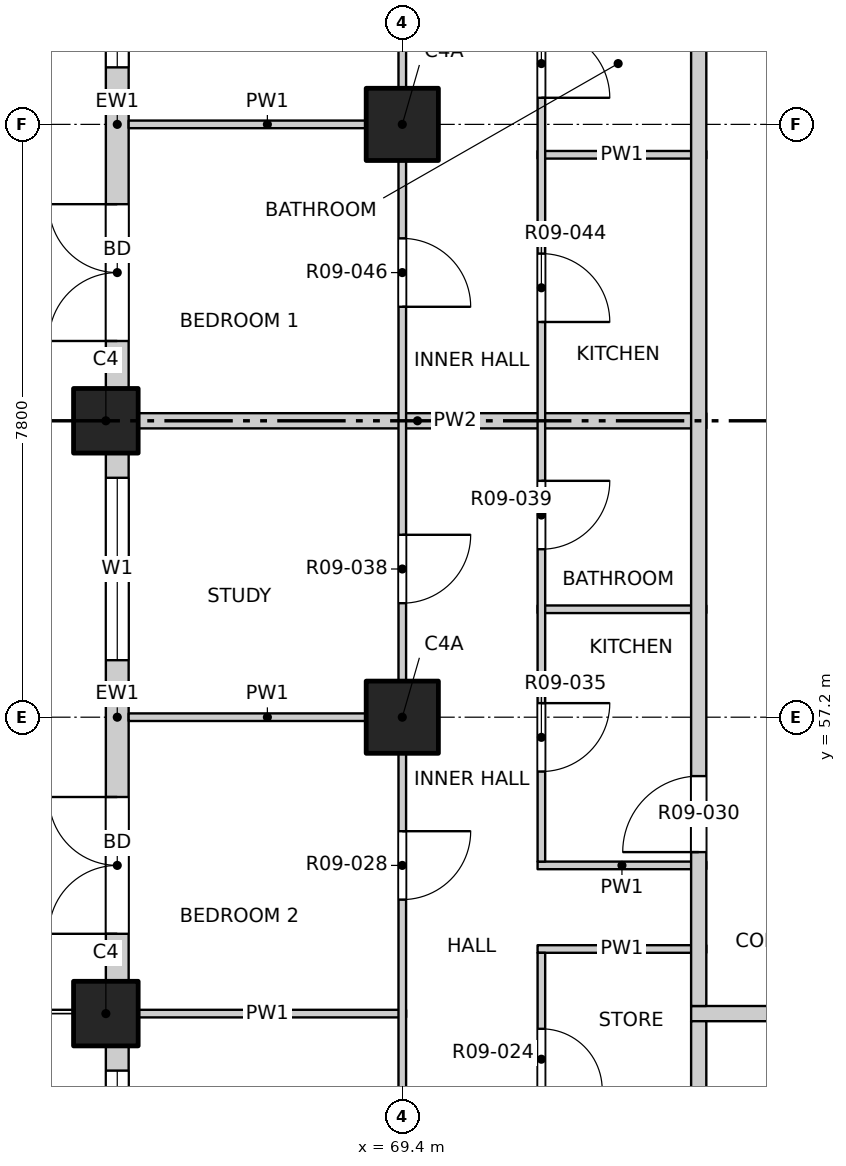
"""IFC4 building model, lengths in metres.
Left out: names, types, materials, properties, quantities, classifications, styles, units other than length and angle.
Written with IfcOpenShell. Run it as: python <this file> out.ifc"""

import sys

from ifc_helpers import new_model, si_unit, direction, frame, frame_2d, origin, origin_2d, place, context, subcontext, project, spatial, rectangle, extrude, element, fill, save


model = new_model("IFC4")
c1 = context("Model", 3, precision=1e-05, world=origin(), true_north=direction((0.0, 1.0)))
c2 = subcontext(c1, "Body", "Model", "MODEL_VIEW")
j1 = project(units=[si_unit("LENGTHUNIT", "METRE"), si_unit("PLANEANGLEUNIT", "RADIAN")], contexts=[c1])
p1 = place(None, origin())
s1 = spatial("IfcSite", under=j1, at=p1, CompositionType="ELEMENT")
p2 = place(p1, origin())
s2 = spatial("IfcBuilding", under=s1, at=p2, CompositionType="ELEMENT")
p3 = place(p2, frame((0.0, 0.0, 113.5)))
s3 = spatial("IfcBuildingStorey", under=s2, at=p3, CompositionType="ELEMENT", Elevation=113.5)
for number, where, z_axis, x_axis in (
    (1, (65.5, 53.3, -0.25), (0.0, 0.0, 1.0), (1.0, 0.0, 0.0)),
    (2, (65.5, 61.1, -0.25), (0.0, 0.0, 1.0), (1.0, 0.0, 0.0)),
):
    element("IfcColumn", number, at=place(p3, frame(where, z_axis=z_axis, x_axis=x_axis)), inside=s3, PredefinedType="COLUMN", context=c2, shape_type="SweptSolid", body=[
        extrude(rectangle(XDim=0.85, YDim=0.85, at=origin_2d()), origin(), (0.0, 0.0, 1.0), 3.35),
    ])
for number, where, z_axis, x_axis in (
    (3, (69.4, 57.2, -0.25), (0.0, 0.0, 1.0), (1.0, 0.0, 0.0)),
    (4, (69.4, 65.0, -0.25), (0.0, 0.0, 1.0), (1.0, 0.0, 0.0)),
):
    element("IfcColumn", number, at=place(p3, frame(where, z_axis=z_axis, x_axis=x_axis)), inside=s3, PredefinedType="COLUMN", context=c2, shape_type="SweptSolid", body=[
        extrude(rectangle(XDim=0.95, YDim=0.95, at=origin_2d()), origin(), (0.0, 0.0, 1.0), 3.35),
    ])
p4 = place(p3, frame((65.65, 49.4, 0.0), z_axis=(0.0, 0.0, 1.0), x_axis=(0.0, 1.0, 0.0)))
e5 = element("IfcWall", 5, at=p4, inside=s3, PredefinedType="SOLIDWALL", context=c2, shape_type="SweptSolid", body=[
    extrude(rectangle(XDim=3.475, YDim=0.3, at=frame_2d((1.738, 0.0))), origin(), (0.0, 0.0, 1.0), 3.1),
])
p5 = place(p4, frame((0.75, 0.0, 0.9)))
e6 = element("IfcOpeningElement", 6, at=p5, cuts=e5, PredefinedType="OPENING", context=c2, shape_type="SweptSolid", body=[
    extrude(rectangle(XDim=2.4, YDim=1.8, at=frame_2d((1.2, 0.9))), frame((0.0, 0.16, 0.0), z_axis=(0.0, -1.0, 0.0), x_axis=(1.0, 0.0, 0.0)), (0.0, 0.0, 1.0), 0.32),
])
p6 = place(p3, frame((65.65, 53.725, 0.0), z_axis=(0.0, 0.0, 1.0), x_axis=(0.0, 1.0, 0.0)))
e7 = element("IfcWall", 7, at=p6, inside=s3, PredefinedType="SOLIDWALL", context=c2, shape_type="SweptSolid", body=[
    extrude(rectangle(XDim=6.95, YDim=0.3, at=frame_2d((3.475, 0.0))), origin(), (0.0, 0.0, 1.0), 3.1),
])
p7 = place(p6, frame((0.625, 0.0, 0.0)))
e8 = element("IfcOpeningElement", 8, at=p7, cuts=e7, PredefinedType="OPENING", context=c2, shape_type="SweptSolid", body=[
    extrude(rectangle(XDim=1.8, YDim=2.4, at=frame_2d((0.9, 1.2))), frame((0.0, 0.16, 0.0), z_axis=(0.0, -1.0, 0.0), x_axis=(1.0, 0.0, 0.0)), (0.0, 0.0, 1.0), 0.32),
])
p8 = place(p6, frame((4.225, 0.0, 0.9)))
e9 = element("IfcOpeningElement", 9, at=p8, cuts=e7, PredefinedType="OPENING", context=c2, shape_type="SweptSolid", body=[
    extrude(rectangle(XDim=2.4, YDim=1.8, at=frame_2d((1.2, 0.9))), frame((0.0, 0.16, 0.0), z_axis=(0.0, -1.0, 0.0), x_axis=(1.0, 0.0, 0.0)), (0.0, 0.0, 1.0), 0.32),
])
p9 = place(p3, frame((65.65, 61.525, 0.0), z_axis=(0.0, 0.0, 1.0), x_axis=(0.0, 1.0, 0.0)))
e10 = element("IfcWall", 10, at=p9, inside=s3, PredefinedType="SOLIDWALL", context=c2, shape_type="SweptSolid", body=[
    extrude(rectangle(XDim=6.95, YDim=0.3, at=frame_2d((3.475, 0.0))), origin(), (0.0, 0.0, 1.0), 3.1),
])
p10 = place(p9, frame((0.625, 0.0, 0.0)))
e11 = element("IfcOpeningElement", 11, at=p10, cuts=e10, PredefinedType="OPENING", context=c2, shape_type="SweptSolid", body=[
    extrude(rectangle(XDim=1.8, YDim=2.4, at=frame_2d((0.9, 1.2))), frame((0.0, 0.16, 0.0), z_axis=(0.0, -1.0, 0.0), x_axis=(1.0, 0.0, 0.0)), (0.0, 0.0, 1.0), 0.32),
])
p11 = place(p9, frame((4.225, 0.0, 0.9)))
e12 = element("IfcOpeningElement", 12, at=p11, cuts=e10, PredefinedType="OPENING", context=c2, shape_type="SweptSolid", body=[
    extrude(rectangle(XDim=2.4, YDim=1.8, at=frame_2d((1.2, 0.9))), frame((0.0, 0.16, 0.0), z_axis=(0.0, -1.0, 0.0), x_axis=(1.0, 0.0, 0.0)), (0.0, 0.0, 1.0), 0.32),
])
p12 = place(p3, frame((65.8, 53.3, 0.0), z_axis=(0.0, 0.0, 1.0), x_axis=(1.0, 0.0, 0.0)))
e13 = element("IfcWall", 13, at=p12, inside=s3, PredefinedType="PARTITIONING", context=c2, shape_type="SweptSolid", body=[
    extrude(rectangle(XDim=3.65, YDim=0.1, at=frame_2d((1.825, 0.0))), origin(), (0.0, 0.0, 1.0), 3.1),
])
p13 = place(p3, frame((73.2, 53.3, 0.0), z_axis=(0.0, 0.0, 1.0), x_axis=(1.0, 0.0, 0.0)))
e14 = element("IfcWall", 14, at=p13, inside=s3, PredefinedType="PARTITIONING", context=c2, shape_type="SweptSolid", body=[
    extrude(rectangle(XDim=23.6, YDim=0.2, at=frame_2d((11.8, 0.0))), origin(), (0.0, 0.0, 1.0), 3.1),
])
p14 = place(p13, frame((10.375, 0.0, 0.0)))
e15 = element("IfcOpeningElement", 15, at=p14, cuts=e14, PredefinedType="OPENING", context=c2, shape_type="SweptSolid", body=[
    extrude(rectangle(XDim=1.0, YDim=2.1, at=frame_2d((0.5, 1.05))), frame((0.0, 0.11, 0.0), z_axis=(0.0, -1.0, 0.0), x_axis=(1.0, 0.0, 0.0)), (0.0, 0.0, 1.0), 0.22),
])
p15 = place(p13, frame((22.075, 0.0, 0.0)))
e16 = element("IfcOpeningElement", 16, at=p15, cuts=e14, PredefinedType="OPENING", context=c2, shape_type="SweptSolid", body=[
    extrude(rectangle(XDim=1.0, YDim=2.1, at=frame_2d((0.5, 1.05))), frame((0.0, 0.11, 0.0), z_axis=(0.0, -1.0, 0.0), x_axis=(1.0, 0.0, 0.0)), (0.0, 0.0, 1.0), 0.22),
])
for number, where, z_axis, x_axis in (
    (17, (71.18, 54.15, 0.0), (0.0, 0.0, 1.0), (1.0, 0.0, 0.0)),
    (18, (71.18, 55.25, 0.0), (0.0, 0.0, 1.0), (1.0, 0.0, 0.0)),
):
    element("IfcWall", number, at=place(p3, frame(where, z_axis=z_axis, x_axis=x_axis)), inside=s3, PredefinedType="PARTITIONING", context=c2, shape_type="SweptSolid", body=[
        extrude(rectangle(XDim=2.22, YDim=0.1, at=frame_2d((1.11, 0.0))), origin(), (0.0, 0.0, 1.0), 3.1),
    ])
p16 = place(p3, frame((65.8, 57.2, 0.0), z_axis=(0.0, 0.0, 1.0), x_axis=(1.0, 0.0, 0.0)))
e19 = element("IfcWall", 19, at=p16, inside=s3, PredefinedType="PARTITIONING", context=c2, shape_type="SweptSolid", body=[
    extrude(rectangle(XDim=3.65, YDim=0.1, at=frame_2d((1.825, 0.0))), origin(), (0.0, 0.0, 1.0), 3.1),
])
p17 = place(p3, frame((71.18, 58.62, 0.0), z_axis=(0.0, 0.0, 1.0), x_axis=(1.0, 0.0, 0.0)))
e20 = element("IfcWall", 20, at=p17, inside=s3, PredefinedType="PARTITIONING", context=c2, shape_type="SweptSolid", body=[
    extrude(rectangle(XDim=2.22, YDim=0.1, at=frame_2d((1.11, 0.0))), origin(), (0.0, 0.0, 1.0), 3.1),
])
p18 = place(p3, frame((65.8, 61.1, 0.0), z_axis=(0.0, 0.0, 1.0), x_axis=(1.0, 0.0, 0.0)))
e21 = element("IfcWall", 21, at=p18, inside=s3, PredefinedType="PARTITIONING", context=c2, shape_type="SweptSolid", body=[
    extrude(rectangle(XDim=7.6, YDim=0.2, at=frame_2d((3.8, 0.0))), origin(), (0.0, 0.0, 1.0), 3.1),
])
p19 = place(p3, frame((71.18, 64.6, 0.0), z_axis=(0.0, 0.0, 1.0), x_axis=(1.0, 0.0, 0.0)))
e22 = element("IfcWall", 22, at=p19, inside=s3, PredefinedType="PARTITIONING", context=c2, shape_type="SweptSolid", body=[
    extrude(rectangle(XDim=2.22, YDim=0.1, at=frame_2d((1.11, 0.0))), origin(), (0.0, 0.0, 1.0), 3.1),
])
p20 = place(p3, frame((65.8, 65.0, 0.0), z_axis=(0.0, 0.0, 1.0), x_axis=(1.0, 0.0, 0.0)))
e23 = element("IfcWall", 23, at=p20, inside=s3, PredefinedType="PARTITIONING", context=c2, shape_type="SweptSolid", body=[
    extrude(rectangle(XDim=3.65, YDim=0.1, at=frame_2d((1.825, 0.0))), origin(), (0.0, 0.0, 1.0), 3.1),
])
p21 = place(p3, frame((69.4, 45.8, 0.0), z_axis=(0.0, 0.0, 1.0), x_axis=(0.0, 1.0, 0.0)))
e24 = element("IfcWall", 24, at=p21, inside=s3, PredefinedType="PARTITIONING", context=c2, shape_type="SweptSolid", body=[
    extrude(rectangle(XDim=38.4, YDim=0.1, at=frame_2d((19.2, 0.0))), origin(), (0.0, 0.0, 1.0), 3.1),
])
p22 = place(p21, frame((1.05, 0.0, 0.0)))
e25 = element("IfcOpeningElement", 25, at=p22, cuts=e24, PredefinedType="OPENING", context=c2, shape_type="SweptSolid", body=[
    extrude(rectangle(XDim=1.2, YDim=2.1, at=frame_2d((0.6, 1.05))), frame((0.0, 0.06, 0.0), z_axis=(0.0, -1.0, 0.0), x_axis=(1.0, 0.0, 0.0)), (0.0, 0.0, 1.0), 0.12),
])
p23 = place(p21, frame((5.1, 0.0, 0.0)))
e26 = element("IfcOpeningElement", 26, at=p23, cuts=e24, PredefinedType="OPENING", context=c2, shape_type="SweptSolid", body=[
    extrude(rectangle(XDim=0.9, YDim=2.1, at=frame_2d((0.45, 1.05))), frame((0.0, 0.06, 0.0), z_axis=(0.0, -1.0, 0.0), x_axis=(1.0, 0.0, 0.0)), (0.0, 0.0, 1.0), 0.12),
])
p24 = place(p21, frame((9.0, 0.0, 0.0)))
e27 = element("IfcOpeningElement", 27, at=p24, cuts=e24, PredefinedType="OPENING", context=c2, shape_type="SweptSolid", body=[
    extrude(rectangle(XDim=0.9, YDim=2.1, at=frame_2d((0.45, 1.05))), frame((0.0, 0.06, 0.0), z_axis=(0.0, -1.0, 0.0), x_axis=(1.0, 0.0, 0.0)), (0.0, 0.0, 1.0), 0.12),
])
p25 = place(p21, frame((12.9, 0.0, 0.0)))
e28 = element("IfcOpeningElement", 28, at=p25, cuts=e24, PredefinedType="OPENING", context=c2, shape_type="SweptSolid", body=[
    extrude(rectangle(XDim=0.9, YDim=2.1, at=frame_2d((0.45, 1.05))), frame((0.0, 0.06, 0.0), z_axis=(0.0, -1.0, 0.0), x_axis=(1.0, 0.0, 0.0)), (0.0, 0.0, 1.0), 0.12),
])
p26 = place(p21, frame((16.8, 0.0, 0.0)))
e29 = element("IfcOpeningElement", 29, at=p26, cuts=e24, PredefinedType="OPENING", context=c2, shape_type="SweptSolid", body=[
    extrude(rectangle(XDim=0.9, YDim=2.1, at=frame_2d((0.45, 1.05))), frame((0.0, 0.06, 0.0), z_axis=(0.0, -1.0, 0.0), x_axis=(1.0, 0.0, 0.0)), (0.0, 0.0, 1.0), 0.12),
])
p27 = place(p21, frame((20.7, 0.0, 0.0)))
e30 = element("IfcOpeningElement", 30, at=p27, cuts=e24, PredefinedType="OPENING", context=c2, shape_type="SweptSolid", body=[
    extrude(rectangle(XDim=0.9, YDim=2.1, at=frame_2d((0.45, 1.05))), frame((0.0, 0.06, 0.0), z_axis=(0.0, -1.0, 0.0), x_axis=(1.0, 0.0, 0.0)), (0.0, 0.0, 1.0), 0.12),
])
p28 = place(p21, frame((24.6, 0.0, 0.0)))
e31 = element("IfcOpeningElement", 31, at=p28, cuts=e24, PredefinedType="OPENING", context=c2, shape_type="SweptSolid", body=[
    extrude(rectangle(XDim=0.9, YDim=2.1, at=frame_2d((0.45, 1.05))), frame((0.0, 0.06, 0.0), z_axis=(0.0, -1.0, 0.0), x_axis=(1.0, 0.0, 0.0)), (0.0, 0.0, 1.0), 0.12),
])
p29 = place(p21, frame((28.5, 0.0, 0.0)))
e32 = element("IfcOpeningElement", 32, at=p29, cuts=e24, PredefinedType="OPENING", context=c2, shape_type="SweptSolid", body=[
    extrude(rectangle(XDim=0.9, YDim=2.1, at=frame_2d((0.45, 1.05))), frame((0.0, 0.06, 0.0), z_axis=(0.0, -1.0, 0.0), x_axis=(1.0, 0.0, 0.0)), (0.0, 0.0, 1.0), 0.12),
])
p30 = place(p21, frame((32.4, 0.0, 0.0)))
e33 = element("IfcOpeningElement", 33, at=p30, cuts=e24, PredefinedType="OPENING", context=c2, shape_type="SweptSolid", body=[
    extrude(rectangle(XDim=0.9, YDim=2.1, at=frame_2d((0.45, 1.05))), frame((0.0, 0.06, 0.0), z_axis=(0.0, -1.0, 0.0), x_axis=(1.0, 0.0, 0.0)), (0.0, 0.0, 1.0), 0.12),
])
p31 = place(p21, frame((36.15, 0.0, 0.0)))
e34 = element("IfcOpeningElement", 34, at=p31, cuts=e24, PredefinedType="OPENING", context=c2, shape_type="SweptSolid", body=[
    extrude(rectangle(XDim=1.2, YDim=2.1, at=frame_2d((0.6, 1.05))), frame((0.0, 0.06, 0.0), z_axis=(0.0, -1.0, 0.0), x_axis=(1.0, 0.0, 0.0)), (0.0, 0.0, 1.0), 0.12),
])
p32 = place(p3, frame((71.23, 49.45, 0.0), z_axis=(0.0, 0.0, 1.0), x_axis=(0.0, 1.0, 0.0)))
e35 = element("IfcWall", 35, at=p32, inside=s3, PredefinedType="PARTITIONING", context=c2, shape_type="SweptSolid", body=[
    extrude(rectangle(XDim=4.65, YDim=0.1, at=frame_2d((2.325, 0.0))), origin(), (0.0, 0.0, 1.0), 3.1),
])
p33 = place(p32, frame((0.425, 0.0, 0.0)))
e36 = element("IfcOpeningElement", 36, at=p33, cuts=e35, PredefinedType="OPENING", context=c2, shape_type="SweptSolid", body=[
    extrude(rectangle(XDim=0.9, YDim=2.1, at=frame_2d((0.45, 1.05))), frame((0.0, 0.06, 0.0), z_axis=(0.0, -1.0, 0.0), x_axis=(1.0, 0.0, 0.0)), (0.0, 0.0, 1.0), 0.12),
])
p34 = place(p32, frame((2.85, 0.0, 0.0)))
e37 = element("IfcOpeningElement", 37, at=p34, cuts=e35, PredefinedType="OPENING", context=c2, shape_type="SweptSolid", body=[
    extrude(rectangle(XDim=0.8, YDim=2.1, at=frame_2d((0.4, 1.05))), frame((0.0, 0.06, 0.0), z_axis=(0.0, -1.0, 0.0), x_axis=(1.0, 0.0, 0.0)), (0.0, 0.0, 1.0), 0.12),
])
p35 = place(p3, frame((71.23, 55.3, 0.0), z_axis=(0.0, 0.0, 1.0), x_axis=(0.0, 1.0, 0.0)))
e38 = element("IfcWall", 38, at=p35, inside=s3, PredefinedType="PARTITIONING", context=c2, shape_type="SweptSolid", body=[
    extrude(rectangle(XDim=11.65, YDim=0.1, at=frame_2d((5.825, 0.0))), origin(), (0.0, 0.0, 1.0), 3.1),
])
p36 = place(p35, frame((1.185, 0.0, 0.0)))
e39 = element("IfcOpeningElement", 39, at=p36, cuts=e38, PredefinedType="OPENING", context=c2, shape_type="SweptSolid", body=[
    extrude(rectangle(XDim=0.9, YDim=2.1, at=frame_2d((0.45, 1.05))), frame((0.0, 0.06, 0.0), z_axis=(0.0, -1.0, 0.0), x_axis=(1.0, 0.0, 0.0)), (0.0, 0.0, 1.0), 0.12),
])
p37 = place(p35, frame((4.11, 0.0, 0.0)))
e40 = element("IfcOpeningElement", 40, at=p37, cuts=e38, PredefinedType="OPENING", context=c2, shape_type="SweptSolid", body=[
    extrude(rectangle(XDim=0.9, YDim=2.1, at=frame_2d((0.45, 1.05))), frame((0.0, 0.06, 0.0), z_axis=(0.0, -1.0, 0.0), x_axis=(1.0, 0.0, 0.0)), (0.0, 0.0, 1.0), 0.12),
])
p38 = place(p35, frame((7.1, 0.0, 0.0)))
e41 = element("IfcOpeningElement", 41, at=p38, cuts=e38, PredefinedType="OPENING", context=c2, shape_type="SweptSolid", body=[
    extrude(rectangle(XDim=0.9, YDim=2.1, at=frame_2d((0.45, 1.05))), frame((0.0, 0.06, 0.0), z_axis=(0.0, -1.0, 0.0), x_axis=(1.0, 0.0, 0.0)), (0.0, 0.0, 1.0), 0.12),
])
p39 = place(p35, frame((10.05, 0.0, 0.0)))
e42 = element("IfcOpeningElement", 42, at=p39, cuts=e38, PredefinedType="OPENING", context=c2, shape_type="SweptSolid", body=[
    extrude(rectangle(XDim=0.9, YDim=2.1, at=frame_2d((0.45, 1.05))), frame((0.0, 0.06, 0.0), z_axis=(0.0, -1.0, 0.0), x_axis=(1.0, 0.0, 0.0)), (0.0, 0.0, 1.0), 0.12),
])
p40 = place(p3, frame((73.3, 45.8, 0.0), z_axis=(0.0, 0.0, 1.0), x_axis=(0.0, 1.0, 0.0)))
e43 = element("IfcWall", 43, at=p40, inside=s3, PredefinedType="PARTITIONING", context=c2, shape_type="SweptSolid", body=[
    extrude(rectangle(XDim=7.4, YDim=0.2, at=frame_2d((3.7, 0.0))), origin(), (0.0, 0.0, 1.0), 3.1),
])
p41 = place(p3, frame((73.3, 53.4, 0.0), z_axis=(0.0, 0.0, 1.0), x_axis=(0.0, 1.0, 0.0)))
e44 = element("IfcWall", 44, at=p41, inside=s3, PredefinedType="PARTITIONING", context=c2, shape_type="SweptSolid", body=[
    extrude(rectangle(XDim=30.8, YDim=0.2, at=frame_2d((15.4, 0.0))), origin(), (0.0, 0.0, 1.0), 3.1),
])
p42 = place(p41, frame((2.025, 0.0, 0.0)))
e45 = element("IfcOpeningElement", 45, at=p42, cuts=e44, PredefinedType="OPENING", context=c2, shape_type="SweptSolid", body=[
    extrude(rectangle(XDim=1.0, YDim=2.1, at=frame_2d((0.5, 1.05))), frame((0.0, 0.11, 0.0), z_axis=(0.0, -1.0, 0.0), x_axis=(1.0, 0.0, 0.0)), (0.0, 0.0, 1.0), 0.22),
])
p43 = place(p41, frame((14.875, 0.0, 0.0)))
e46 = element("IfcOpeningElement", 46, at=p43, cuts=e44, PredefinedType="OPENING", context=c2, shape_type="SweptSolid", body=[
    extrude(rectangle(XDim=1.0, YDim=2.1, at=frame_2d((0.5, 1.05))), frame((0.0, 0.11, 0.0), z_axis=(0.0, -1.0, 0.0), x_axis=(1.0, 0.0, 0.0)), (0.0, 0.0, 1.0), 0.22),
])
p44 = place(p41, frame((25.225, 0.0, 0.0)))
e47 = element("IfcOpeningElement", 47, at=p44, cuts=e44, PredefinedType="OPENING", context=c2, shape_type="SweptSolid", body=[
    extrude(rectangle(XDim=1.0, YDim=2.1, at=frame_2d((0.5, 1.05))), frame((0.0, 0.11, 0.0), z_axis=(0.0, -1.0, 0.0), x_axis=(1.0, 0.0, 0.0)), (0.0, 0.0, 1.0), 0.22),
])
p45 = place(p5, origin())
e48 = element("IfcWindow", 48, at=p45, inside=s3, PartitioningType="DOUBLE_PANEL_VERTICAL", PredefinedType="WINDOW", context=c2, shape_type="SweptSolid", body=[
    extrude(rectangle(XDim=2.4, YDim=1.8, at=frame_2d((1.2, 0.9))), frame((0.0, 0.03, 0.0), z_axis=(0.0, -1.0, 0.0), x_axis=(1.0, 0.0, 0.0)), (0.0, 0.0, 1.0), 0.06),
])
fill(e6, e48)
p46 = place(p7, origin())
e49 = element("IfcDoor", 49, at=p46, inside=s3, OperationType="DOUBLE_DOOR_SINGLE_SWING", PredefinedType="DOOR", context=c2, shape_type="SweptSolid", body=[
    extrude(rectangle(XDim=1.8, YDim=2.4, at=frame_2d((0.9, 1.2))), frame((0.0, 0.025, 0.0), z_axis=(0.0, -1.0, 0.0), x_axis=(1.0, 0.0, 0.0)), (0.0, 0.0, 1.0), 0.05),
])
fill(e8, e49)
p47 = place(p8, origin())
e50 = element("IfcWindow", 50, at=p47, inside=s3, PartitioningType="DOUBLE_PANEL_VERTICAL", PredefinedType="WINDOW", context=c2, shape_type="SweptSolid", body=[
    extrude(rectangle(XDim=2.4, YDim=1.8, at=frame_2d((1.2, 0.9))), frame((0.0, 0.03, 0.0), z_axis=(0.0, -1.0, 0.0), x_axis=(1.0, 0.0, 0.0)), (0.0, 0.0, 1.0), 0.06),
])
fill(e9, e50)
p48 = place(p10, origin())
e51 = element("IfcDoor", 51, at=p48, inside=s3, OperationType="DOUBLE_DOOR_SINGLE_SWING", PredefinedType="DOOR", context=c2, shape_type="SweptSolid", body=[
    extrude(rectangle(XDim=1.8, YDim=2.4, at=frame_2d((0.9, 1.2))), frame((0.0, 0.025, 0.0), z_axis=(0.0, -1.0, 0.0), x_axis=(1.0, 0.0, 0.0)), (0.0, 0.0, 1.0), 0.05),
])
fill(e11, e51)
p49 = place(p11, origin())
e52 = element("IfcWindow", 52, at=p49, inside=s3, PartitioningType="DOUBLE_PANEL_VERTICAL", PredefinedType="WINDOW", context=c2, shape_type="SweptSolid", body=[
    extrude(rectangle(XDim=2.4, YDim=1.8, at=frame_2d((1.2, 0.9))), frame((0.0, 0.03, 0.0), z_axis=(0.0, -1.0, 0.0), x_axis=(1.0, 0.0, 0.0)), (0.0, 0.0, 1.0), 0.06),
])
fill(e12, e52)
p50 = place(p34, origin())
e53 = element("IfcDoor", 53, at=p50, inside=s3, OperationType="SINGLE_SWING_RIGHT", PredefinedType="DOOR", context=c2, shape_type="SweptSolid", body=[
    extrude(rectangle(XDim=0.8, YDim=2.1, at=frame_2d((0.4, 1.05))), frame((0.0, 0.025, 0.0), z_axis=(0.0, -1.0, 0.0), x_axis=(1.0, 0.0, 0.0)), (0.0, 0.0, 1.0), 0.05),
])
fill(e37, e53)
p51 = place(p24, origin())
e54 = element("IfcDoor", 54, at=p51, inside=s3, OperationType="SINGLE_SWING_LEFT", PredefinedType="DOOR", context=c2, shape_type="SweptSolid", body=[
    extrude(rectangle(XDim=0.9, YDim=2.1, at=frame_2d((0.45, 1.05))), frame((0.0, 0.025, 0.0), z_axis=(0.0, -1.0, 0.0), x_axis=(1.0, 0.0, 0.0)), (0.0, 0.0, 1.0), 0.05),
])
fill(e27, e54)
p52 = place(p42, origin())
e55 = element("IfcDoor", 55, at=p52, inside=s3, OperationType="SINGLE_SWING_RIGHT", PredefinedType="DOOR", context=c2, shape_type="SweptSolid", body=[
    extrude(rectangle(XDim=1.0, YDim=2.1, at=frame_2d((0.5, 1.05))), frame((0.0, 0.025, 0.0), z_axis=(0.0, -1.0, 0.0), x_axis=(1.0, 0.0, 0.0)), (0.0, 0.0, 1.0), 0.05),
])
fill(e45, e55)
p53 = place(p36, origin())
e56 = element("IfcDoor", 56, at=p53, inside=s3, OperationType="SINGLE_SWING_LEFT", PredefinedType="DOOR", context=c2, shape_type="SweptSolid", body=[
    extrude(rectangle(XDim=0.9, YDim=2.1, at=frame_2d((0.45, 1.05))), frame((0.0, 0.025, 0.0), z_axis=(0.0, -1.0, 0.0), x_axis=(1.0, 0.0, 0.0)), (0.0, 0.0, 1.0), 0.05),
])
fill(e39, e56)
p54 = place(p25, origin())
e57 = element("IfcDoor", 57, at=p54, inside=s3, OperationType="SINGLE_SWING_LEFT", PredefinedType="DOOR", context=c2, shape_type="SweptSolid", body=[
    extrude(rectangle(XDim=0.9, YDim=2.1, at=frame_2d((0.45, 1.05))), frame((0.0, 0.025, 0.0), z_axis=(0.0, -1.0, 0.0), x_axis=(1.0, 0.0, 0.0)), (0.0, 0.0, 1.0), 0.05),
])
fill(e28, e57)
p55 = place(p37, origin())
e58 = element("IfcDoor", 58, at=p55, inside=s3, OperationType="SINGLE_SWING_LEFT", PredefinedType="DOOR", context=c2, shape_type="SweptSolid", body=[
    extrude(rectangle(XDim=0.9, YDim=2.1, at=frame_2d((0.45, 1.05))), frame((0.0, 0.025, 0.0), z_axis=(0.0, -1.0, 0.0), x_axis=(1.0, 0.0, 0.0)), (0.0, 0.0, 1.0), 0.05),
])
fill(e40, e58)
p56 = place(p38, origin())
e59 = element("IfcDoor", 59, at=p56, inside=s3, OperationType="SINGLE_SWING_RIGHT", PredefinedType="DOOR", context=c2, shape_type="SweptSolid", body=[
    extrude(rectangle(XDim=0.9, YDim=2.1, at=frame_2d((0.45, 1.05))), frame((0.0, 0.025, 0.0), z_axis=(0.0, -1.0, 0.0), x_axis=(1.0, 0.0, 0.0)), (0.0, 0.0, 1.0), 0.05),
])
fill(e41, e59)
p57 = place(p26, origin())
e60 = element("IfcDoor", 60, at=p57, inside=s3, OperationType="SINGLE_SWING_RIGHT", PredefinedType="DOOR", context=c2, shape_type="SweptSolid", body=[
    extrude(rectangle(XDim=0.9, YDim=2.1, at=frame_2d((0.45, 1.05))), frame((0.0, 0.025, 0.0), z_axis=(0.0, -1.0, 0.0), x_axis=(1.0, 0.0, 0.0)), (0.0, 0.0, 1.0), 0.05),
])
fill(e29, e60)
p58 = place(p39, origin())
e61 = element("IfcDoor", 61, at=p58, inside=s3, OperationType="SINGLE_SWING_RIGHT", PredefinedType="DOOR", context=c2, shape_type="SweptSolid", body=[
    extrude(rectangle(XDim=0.9, YDim=2.1, at=frame_2d((0.45, 1.05))), frame((0.0, 0.025, 0.0), z_axis=(0.0, -1.0, 0.0), x_axis=(1.0, 0.0, 0.0)), (0.0, 0.0, 1.0), 0.05),
])
fill(e42, e61)
save(model, sys.argv[1])
